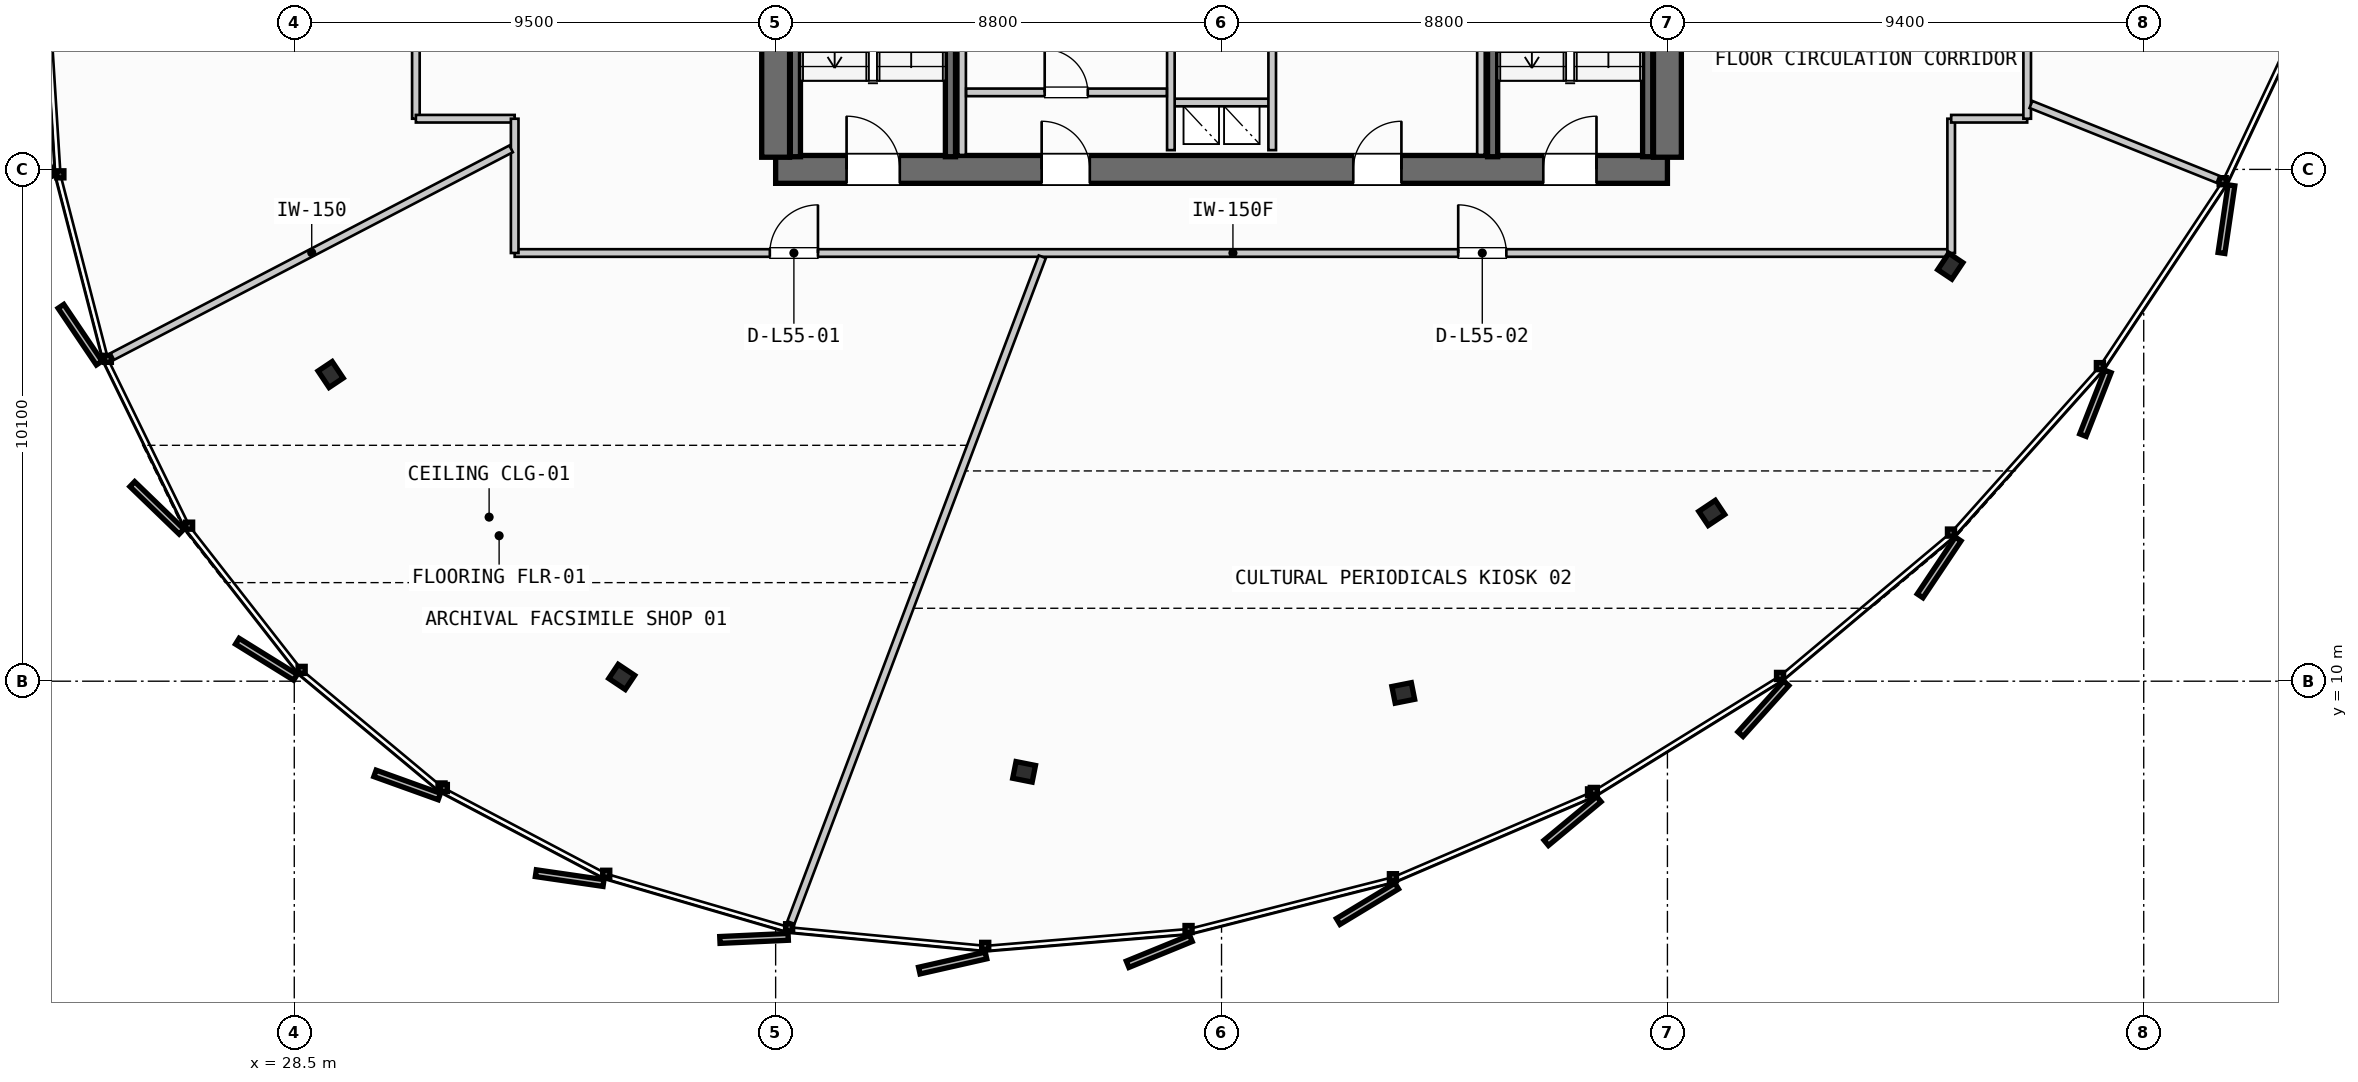
"""IFC4 building model, lengths in metres.
Left out: names, types, materials, properties, quantities, classifications, styles, units other than length and angle.
Written with IfcOpenShell. Run it as: python <this file> out.ifc"""

import sys

from ifc_helpers import new_model, si_unit, direction, frame, frame_2d, origin, origin_2d, place, context, subcontext, project, spatial, rectangle, i_section, extrude, source, transform, mapped, element, fill, save


model = new_model("IFC4")
c1 = context("Model", 3, precision=1e-05, world=origin(), true_north=direction((0.0, 1.0)))
c2 = subcontext(c1, "Body", "Model", "MODEL_VIEW")
j1 = project(units=[si_unit("LENGTHUNIT", "METRE"), si_unit("PLANEANGLEUNIT", "RADIAN")], contexts=[c1])
p1 = place(None, origin())
s1 = spatial("IfcSite", under=j1, at=p1, CompositionType="ELEMENT")
p2 = place(p1, origin())
s2 = spatial("IfcBuilding", under=s1, at=p2, CompositionType="ELEMENT")
p3 = place(p2, frame((0.0, 0.0, 211.4)))
s3 = spatial("IfcBuildingStorey", under=s2, at=p3, CompositionType="ELEMENT", Elevation=211.4)
p4 = place(p3, frame((38.0, 20.1, 0.0), z_axis=(0.0, 0.0, 1.0), x_axis=(1.0, 0.0, 0.0)))
e1 = element("IfcWall", 1, at=p4, inside=s3, PredefinedType="SHEAR", context=c2, shape_type="SweptSolid", body=[
    extrude(rectangle(XDim=17.6, YDim=0.55, at=frame_2d((8.8, 0.0))), origin(), (0.0, 0.0, 1.0), 3.26),
])
p5 = place(p4, frame((1.4, 0.0, 0.0)))
e2 = element("IfcOpeningElement", 2, at=p5, cuts=e1, PredefinedType="OPENING", context=c2, shape_type="SweptSolid", body=[
    extrude(rectangle(XDim=1.05, YDim=2.15, at=frame_2d((0.525, 1.075))), frame((0.0, 0.285, 0.0), z_axis=(0.0, -1.0, 0.0), x_axis=(1.0, 0.0, 0.0)), (0.0, 0.0, 1.0), 0.57),
])
p6 = place(p4, frame((15.15, 0.0, 0.0)))
e3 = element("IfcOpeningElement", 3, at=p6, cuts=e1, PredefinedType="OPENING", context=c2, shape_type="SweptSolid", body=[
    extrude(rectangle(XDim=1.05, YDim=2.15, at=frame_2d((0.525, 1.075))), frame((0.0, 0.285, 0.0), z_axis=(0.0, -1.0, 0.0), x_axis=(1.0, 0.0, 0.0)), (0.0, 0.0, 1.0), 0.57),
])
p7 = place(p4, frame((5.25, 0.0, 0.0)))
e4 = element("IfcOpeningElement", 4, at=p7, cuts=e1, PredefinedType="OPENING", context=c2, shape_type="SweptSolid", body=[
    extrude(rectangle(XDim=0.95, YDim=2.15, at=frame_2d((0.475, 1.075))), frame((0.0, 0.285, 0.0), z_axis=(0.0, -1.0, 0.0), x_axis=(1.0, 0.0, 0.0)), (0.0, 0.0, 1.0), 0.57),
])
p8 = place(p4, frame((11.4, 0.0, 0.0)))
e5 = element("IfcOpeningElement", 5, at=p8, cuts=e1, PredefinedType="OPENING", context=c2, shape_type="SweptSolid", body=[
    extrude(rectangle(XDim=0.95, YDim=2.15, at=frame_2d((0.475, 1.075))), frame((0.0, 0.285, 0.0), z_axis=(0.0, -1.0, 0.0), x_axis=(1.0, 0.0, 0.0)), (0.0, 0.0, 1.0), 0.57),
])
p9 = place(p3, frame((38.0, 35.26, 0.0), z_axis=(0.0, 0.0, 1.0), x_axis=(0.0, -1.0, 0.0)))
e6 = element("IfcWall", 6, at=p9, inside=s3, PredefinedType="SHEAR", context=c2, shape_type="SweptSolid", body=[
    extrude(rectangle(XDim=14.92, YDim=0.55, at=frame_2d((7.46, 0.0))), origin(), (0.0, 0.0, 1.0), 3.26),
])
p10 = place(p9, frame((5.21, 0.0, 0.0)))
e7 = element("IfcOpeningElement", 7, at=p10, cuts=e6, PredefinedType="OPENING", context=c2, shape_type="SweptSolid", body=[
    extrude(rectangle(XDim=1.1, YDim=2.2, at=frame_2d((0.55, 1.1))), frame((0.0, 0.285, 0.0), z_axis=(0.0, -1.0, 0.0), x_axis=(1.0, 0.0, 0.0)), (0.0, 0.0, 1.0), 0.57),
])
p11 = place(p3, frame((55.6, 20.34, 0.0), z_axis=(0.0, 0.0, 1.0), x_axis=(0.0, 1.0, 0.0)))
e8 = element("IfcWall", 8, at=p11, inside=s3, PredefinedType="SHEAR", context=c2, shape_type="SweptSolid", body=[
    extrude(rectangle(XDim=14.92, YDim=0.55, at=frame_2d((7.46, 0.0))), origin(), (0.0, 0.0, 1.0), 3.26),
])
p12 = place(p11, frame((12.71, 0.0, 0.0)))
e9 = element("IfcOpeningElement", 9, at=p12, cuts=e8, PredefinedType="OPENING", context=c2, shape_type="SweptSolid", body=[
    extrude(rectangle(XDim=1.05, YDim=2.15, at=frame_2d((0.525, 1.075))), frame((0.0, 0.285, 0.0), z_axis=(0.0, -1.0, 0.0), x_axis=(1.0, 0.0, 0.0)), (0.0, 0.0, 1.0), 0.57),
])
p13 = place(p11, frame((8.61, 0.0, 0.0)))
e10 = element("IfcOpeningElement", 10, at=p13, cuts=e8, PredefinedType="OPENING", context=c2, shape_type="SweptSolid", body=[
    extrude(rectangle(XDim=1.1, YDim=2.2, at=frame_2d((0.55, 1.1))), frame((0.0, 0.285, 0.0), z_axis=(0.0, -1.0, 0.0), x_axis=(1.0, 0.0, 0.0)), (0.0, 0.0, 1.0), 0.57),
])
m1 = source(origin(), c2, "Body", "SweptSolid", [
    extrude(i_section(OverallWidth=0.391, OverallDepth=0.335, WebThickness=0.023, FlangeThickness=0.034, FilletRadius=0.015, at=origin_2d()), origin(), (0.0, 0.0, 1.0), 3.26),
])
for number, where, z_axis, x_axis in (
    (11, (29.218, 16.052, 0.0), (0.0, 0.0, 1.0), (-0.831, -0.556, 0.0)),
    (12, (34.963, 10.084, 0.0), (0.0, 0.0, 1.0), (-0.556, -0.831, 0.0)),
    (13, (42.904, 8.211, 0.0), (0.0, 0.0, 1.0), (-0.195, -0.981, 0.0)),
    (14, (50.387, 9.769, 0.0), (0.0, 0.0, 1.0), (0.195, -0.981, 0.0)),
    (15, (56.475, 13.321, 0.0), (0.0, 0.0, 1.0), (0.556, -0.831, 0.0)),
    (16, (61.183, 18.19, 0.0), (0.0, 0.0, 1.0), (0.831, -0.556, 0.0)),
):
    element("IfcColumn", number, at=place(p3, frame(where, z_axis=z_axis, x_axis=x_axis)), inside=s3, PredefinedType="COLUMN", context=c2, shape_type="MappedRepresentation", body=[
        mapped(m1, transform((0.0, 0.0, 0.0), scale=1.0)),
    ])
for number, where, z_axis, x_axis in (
    (17, (41.45, 27.7, 0.0), (0.0, 0.0, 1.0), (0.0, -1.0, 0.0)),
    (18, (38.39, 20.35, 0.0), (0.0, 0.0, 1.0), (0.0, 1.0, 0.0)),
    (19, (55.21, 27.7, 0.0), (0.0, 0.0, 1.0), (0.0, -1.0, 0.0)),
    (20, (52.15, 20.35, 0.0), (0.0, 0.0, 1.0), (0.0, 1.0, 0.0)),
):
    element("IfcWall", number, at=place(p3, frame(where, z_axis=z_axis, x_axis=x_axis)), inside=s3, PredefinedType="SHEAR", context=c2, shape_type="SweptSolid", body=[
        extrude(rectangle(XDim=7.35, YDim=0.2, at=frame_2d((3.675, 0.0))), origin(), (0.0, 0.0, 1.0), 3.26),
    ])
p14 = place(p3, frame((45.8, 21.42, 0.0), z_axis=(0.0, 0.0, 1.0), x_axis=(1.0, 0.0, 0.0)))
e21 = element("IfcWall", 21, at=p14, inside=s3, PredefinedType="PARTITIONING", context=c2, shape_type="SweptSolid", body=[
    extrude(rectangle(XDim=2.0, YDim=0.15, at=frame_2d((1.0, 0.0))), origin(), (0.0, 0.0, 1.0), 2.455),
])
for number, where, z_axis, x_axis in (
    (22, (45.8, 20.48, 0.0), (0.0, 0.0, 1.0), (0.0, 1.0, 0.0)),
    (23, (47.8, 20.48, 0.0), (0.0, 0.0, 1.0), (0.0, 1.0, 0.0)),
):
    element("IfcWall", number, at=place(p3, frame(where, z_axis=z_axis, x_axis=x_axis)), inside=s3, PredefinedType="PARTITIONING", context=c2, shape_type="SweptSolid", body=[
        extrude(rectangle(XDim=2.24, YDim=0.15, at=frame_2d((1.12, 0.0))), origin(), (0.0, 0.0, 1.0), 2.455),
    ])
for number, where, z_axis, x_axis in (
    (24, (41.68, 20.385, 0.0), (0.0, 0.0, 1.0), (0.0, 1.0, 0.0)),
    (25, (51.92, 20.385, 0.0), (0.0, 0.0, 1.0), (0.0, 1.0, 0.0)),
):
    element("IfcWall", number, at=place(p3, frame(where, z_axis=z_axis, x_axis=x_axis)), inside=s3, PredefinedType="PARTITIONING", context=c2, shape_type="SweptSolid", body=[
        extrude(rectangle(XDim=2.345, YDim=0.15, at=frame_2d((1.172, 0.0))), origin(), (0.0, 0.0, 1.0), 2.455),
    ])
p15 = place(p3, frame((41.76, 21.62, 0.0), z_axis=(0.0, 0.0, 1.0), x_axis=(1.0, 0.0, 0.0)))
e26 = element("IfcWall", 26, at=p15, inside=s3, PredefinedType="PARTITIONING", context=c2, shape_type="SweptSolid", body=[
    extrude(rectangle(XDim=3.96, YDim=0.15, at=frame_2d((1.98, 0.0))), origin(), (0.0, 0.0, 1.0), 2.455),
])
p16 = place(p15, frame((1.55, 0.0, 0.0)))
e27 = element("IfcOpeningElement", 27, at=p16, cuts=e26, PredefinedType="OPENING", context=c2, shape_type="SweptSolid", body=[
    extrude(rectangle(XDim=0.85, YDim=2.15, at=frame_2d((0.425, 1.075))), frame((0.0, 0.085, 0.0), z_axis=(0.0, -1.0, 0.0), x_axis=(1.0, 0.0, 0.0)), (0.0, 0.0, 1.0), 0.17),
])
p17 = place(p3, frame((32.85, 18.45, 0.0), z_axis=(0.0, 0.0, 1.0), x_axis=(1.0, 0.0, 0.0)))
e28 = element("IfcWall", 28, at=p17, inside=s3, PredefinedType="PARTITIONING", context=c2, shape_type="SweptSolid", body=[
    extrude(rectangle(XDim=28.35, YDim=0.15, at=frame_2d((14.175, 0.0))), origin(), (0.0, 0.0, 1.0), 2.455),
])
p18 = place(p17, frame((5.035, 0.0, 0.0)))
e29 = element("IfcOpeningElement", 29, at=p18, cuts=e28, PredefinedType="OPENING", context=c2, shape_type="SweptSolid", body=[
    extrude(rectangle(XDim=0.95, YDim=2.15, at=frame_2d((0.475, 1.075))), frame((0.0, 0.085, 0.0), z_axis=(0.0, -1.0, 0.0), x_axis=(1.0, 0.0, 0.0)), (0.0, 0.0, 1.0), 0.17),
])
p19 = place(p17, frame((18.621, 0.0, 0.0)))
e30 = element("IfcOpeningElement", 30, at=p19, cuts=e28, PredefinedType="OPENING", context=c2, shape_type="SweptSolid", body=[
    extrude(rectangle(XDim=0.95, YDim=2.15, at=frame_2d((0.475, 1.075))), frame((0.0, 0.085, 0.0), z_axis=(0.0, -1.0, 0.0), x_axis=(1.0, 0.0, 0.0)), (0.0, 0.0, 1.0), 0.17),
])
p20 = place(p3, frame((61.2, 18.45, 0.0), z_axis=(0.0, 0.0, 1.0), x_axis=(0.0, 1.0, 0.0)))
e31 = element("IfcWall", 31, at=p20, inside=s3, PredefinedType="PARTITIONING", context=c2, shape_type="SweptSolid", body=[
    extrude(rectangle(XDim=2.65, YDim=0.15, at=frame_2d((1.325, 0.0))), origin(), (0.0, 0.0, 1.0), 2.455),
])
p21 = place(p3, frame((61.2, 21.1, 0.0), z_axis=(0.0, 0.0, 1.0), x_axis=(1.0, 0.0, 0.0)))
e32 = element("IfcWall", 32, at=p21, inside=s3, PredefinedType="PARTITIONING", context=c2, shape_type="SweptSolid", body=[
    extrude(rectangle(XDim=1.5, YDim=0.15, at=frame_2d((0.75, 0.0))), origin(), (0.0, 0.0, 1.0), 2.455),
])
for number, where, z_axis, x_axis in (
    (33, (62.7, 21.1, 0.0), (0.0, 0.0, 1.0), (0.0, 1.0, 0.0)),
    (34, (30.9, 22.8, 0.0), (0.0, 0.0, 1.0), (0.0, -1.0, 0.0)),
):
    element("IfcWall", number, at=place(p3, frame(where, z_axis=z_axis, x_axis=x_axis)), inside=s3, PredefinedType="PARTITIONING", context=c2, shape_type="SweptSolid", body=[
        extrude(rectangle(XDim=1.7, YDim=0.15, at=frame_2d((0.85, 0.0))), origin(), (0.0, 0.0, 1.0), 2.455),
    ])
p22 = place(p3, frame((30.9, 21.1, 0.0), z_axis=(0.0, 0.0, 1.0), x_axis=(1.0, 0.0, 0.0)))
e35 = element("IfcWall", 35, at=p22, inside=s3, PredefinedType="PARTITIONING", context=c2, shape_type="SweptSolid", body=[
    extrude(rectangle(XDim=1.95, YDim=0.15, at=frame_2d((0.975, 0.0))), origin(), (0.0, 0.0, 1.0), 2.455),
])
p23 = place(p3, frame((32.85, 21.1, 0.0), z_axis=(0.0, 0.0, 1.0), x_axis=(0.0, -1.0, 0.0)))
e36 = element("IfcWall", 36, at=p23, inside=s3, PredefinedType="PARTITIONING", context=c2, shape_type="SweptSolid", body=[
    extrude(rectangle(XDim=2.65, YDim=0.15, at=frame_2d((1.325, 0.0))), origin(), (0.0, 0.0, 1.0), 2.455),
])
p24 = place(p3, frame((32.779, 20.505, 0.0), z_axis=(0.0, 0.0, 1.0), x_axis=(-0.88697068139, -0.461825735916, 0.0)))
e37 = element("IfcWall", 37, at=p24, inside=s3, PredefinedType="PARTITIONING", context=c2, shape_type="SweptSolid", body=[
    extrude(rectangle(XDim=8.872, YDim=0.15, at=frame_2d((4.436, 0.0))), origin(), (0.0, 0.0, 1.0), 2.455),
])
p25 = place(p3, frame((43.262, 18.375, 0.0), z_axis=(0.0, 0.0, 1.0), x_axis=(-0.353263978955, -0.93552368285, 0.0)))
e38 = element("IfcWall", 38, at=p25, inside=s3, PredefinedType="PARTITIONING", context=c2, shape_type="SweptSolid", body=[
    extrude(rectangle(XDim=14.043, YDim=0.15, at=frame_2d((7.021, 0.0))), origin(), (0.0, 0.0, 1.0), 2.455),
])
p26 = place(p3, frame((62.774, 21.381, 0.0), z_axis=(0.0, 0.0, 1.0), x_axis=(0.928434336996, -0.371496543573, 0.0)))
e39 = element("IfcWall", 39, at=p26, inside=s3, PredefinedType="PARTITIONING", context=c2, shape_type="SweptSolid", body=[
    extrude(rectangle(XDim=3.976, YDim=0.15, at=frame_2d((1.988, 0.0))), origin(), (0.0, 0.0, 1.0), 2.455),
])
m2 = source(origin(), c2, "Body", "SweptSolid", [
    extrude(rectangle(XDim=1.05, YDim=2.15, at=frame_2d((0.525, 1.075))), frame((0.0, 0.025, 0.0), z_axis=(0.0, -1.0, 0.0), x_axis=(1.0, 0.0, 0.0)), (0.0, 0.0, 1.0), 0.05),
])
p27 = place(p5, origin())
e40 = element("IfcDoor", 40, at=p27, inside=s3, OperationType="SINGLE_SWING_LEFT", PredefinedType="DOOR", context=c2, shape_type="MappedRepresentation", body=[
    mapped(m2, transform((0.0, 0.0, 0.0), scale=1.0)),
])
fill(e2, e40)
p28 = place(p6, origin())
e41 = element("IfcDoor", 41, at=p28, inside=s3, OperationType="SINGLE_SWING_RIGHT", PredefinedType="DOOR", context=c2, shape_type="MappedRepresentation", body=[
    mapped(m2, transform((0.0, 0.0, 0.0), scale=1.0)),
])
fill(e3, e41)
m3 = source(origin(), c2, "Body", "SweptSolid", [
    extrude(rectangle(XDim=0.95, YDim=2.15, at=frame_2d((0.475, 1.075))), frame((0.0, 0.025, 0.0), z_axis=(0.0, -1.0, 0.0), x_axis=(1.0, 0.0, 0.0)), (0.0, 0.0, 1.0), 0.05),
])
p29 = place(p7, origin())
e42 = element("IfcDoor", 42, at=p29, inside=s3, OperationType="SINGLE_SWING_LEFT", PredefinedType="DOOR", context=c2, shape_type="MappedRepresentation", body=[
    mapped(m3, transform((0.0, 0.0, 0.0), scale=1.0)),
])
fill(e4, e42)
p30 = place(p8, origin())
e43 = element("IfcDoor", 43, at=p30, inside=s3, OperationType="SINGLE_SWING_RIGHT", PredefinedType="DOOR", context=c2, shape_type="MappedRepresentation", body=[
    mapped(m3, transform((0.0, 0.0, 0.0), scale=1.0)),
])
fill(e5, e43)
m4 = source(origin(), c2, "Body", "SweptSolid", [
    extrude(rectangle(XDim=0.85, YDim=2.15, at=frame_2d((0.425, 1.075))), frame((0.0, 0.025, 0.0), z_axis=(0.0, -1.0, 0.0), x_axis=(1.0, 0.0, 0.0)), (0.0, 0.0, 1.0), 0.05),
])
p31 = place(p16, origin())
e44 = element("IfcDoor", 44, at=p31, inside=s3, OperationType="SINGLE_SWING_LEFT", PredefinedType="DOOR", context=c2, shape_type="MappedRepresentation", body=[
    mapped(m4, transform((0.0, 0.0, 0.0), scale=1.0)),
])
fill(e27, e44)
p32 = place(p18, origin())
e45 = element("IfcDoor", 45, at=p32, inside=s3, OperationType="SINGLE_SWING_RIGHT", PredefinedType="DOOR", context=c2, shape_type="MappedRepresentation", body=[
    mapped(m3, transform((0.0, 0.0, 0.0), scale=1.0)),
])
fill(e29, e45)
p33 = place(p19, origin())
e46 = element("IfcDoor", 46, at=p33, inside=s3, OperationType="SINGLE_SWING_LEFT", PredefinedType="DOOR", context=c2, shape_type="MappedRepresentation", body=[
    mapped(m3, transform((0.0, 0.0, 0.0), scale=1.0)),
])
fill(e30, e46)
save(model, sys.argv[1])
